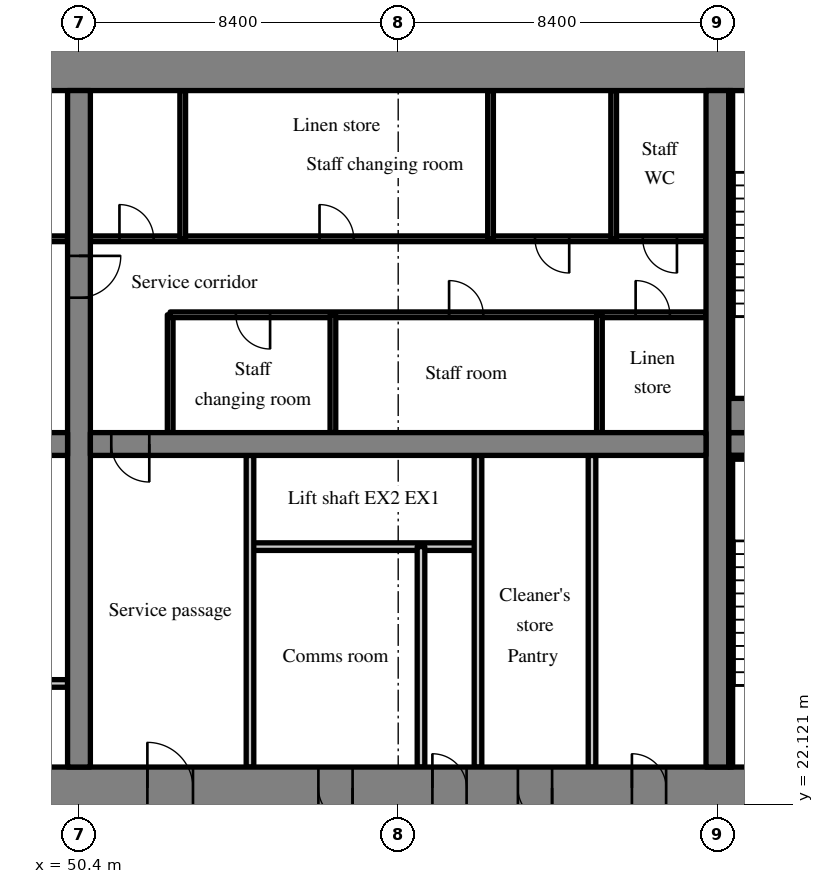
"""IFC4 building model, lengths in metres.
Left out: names, types, materials, properties, quantities, classifications, styles, units other than length and angle.
Written with IfcOpenShell. Run it as: python <this file> out.ifc"""

import sys

from ifc_helpers import new_model, si_unit, direction, frame, frame_2d, origin, place, context, subcontext, project, spatial, rectangle, extrude, source, transform, mapped, element, fill, save


model = new_model("IFC4")
c1 = context("Model", 3, precision=1e-05, world=origin(), true_north=direction((0.0, 1.0)))
c2 = subcontext(c1, "Body", "Model", "MODEL_VIEW")
j1 = project(units=[si_unit("LENGTHUNIT", "METRE"), si_unit("PLANEANGLEUNIT", "RADIAN")], contexts=[c1])
p1 = place(None, origin())
s1 = spatial("IfcSite", under=j1, at=p1, CompositionType="ELEMENT")
p2 = place(p1, origin())
s2 = spatial("IfcBuilding", under=s1, at=p2, CompositionType="ELEMENT")
p3 = place(p2, frame((0.0, 0.0, 18.0)))
s3 = spatial("IfcBuildingStorey", under=s2, at=p3, CompositionType="ELEMENT", Elevation=18.0)
m1 = source(origin(), c2, "Body", "SweptSolid", [
    extrude(rectangle(XDim=50.4, YDim=1.1, at=frame_2d((25.2, 0.0))), origin(), (0.0, 0.0, 1.0), 4.72),
])
p4 = place(p3, frame((25.2, 22.55, 0.0), z_axis=(0.0, 0.0, 1.0), x_axis=(1.0, 0.0, 0.0)))
e1 = element("IfcWall", 1, at=p4, inside=s3, PredefinedType="SHEAR", context=c2, shape_type="MappedRepresentation", body=[
    mapped(m1, transform((0.0, 0.0, 0.0), scale=1.0)),
])
m2 = source(origin(), c2, "Body", "SweptSolid", [
    extrude(rectangle(XDim=1.8, YDim=2.1, at=frame_2d((0.9, 1.05))), frame((0.0, 0.56, 0.0), z_axis=(0.0, -1.0, 0.0), x_axis=(1.0, 0.0, 0.0)), (0.0, 0.0, 1.0), 1.12),
])
p5 = place(p4, frame((15.9, 0.0, 0.0)))
e2 = element("IfcOpeningElement", 2, at=p5, cuts=e1, PredefinedType="OPENING", context=c2, shape_type="MappedRepresentation", body=[
    mapped(m2, transform((0.0, 0.0, 0.0), scale=1.0)),
])
m3 = source(origin(), c2, "Body", "SweptSolid", [
    extrude(rectangle(XDim=1.2, YDim=2.1, at=frame_2d((0.6, 1.05))), frame((0.0, 0.56, 0.0), z_axis=(0.0, -1.0, 0.0), x_axis=(1.0, 0.0, 0.0)), (0.0, 0.0, 1.0), 1.12),
])
p6 = place(p4, frame((27.0, 0.0, 0.0)))
e3 = element("IfcOpeningElement", 3, at=p6, cuts=e1, PredefinedType="OPENING", context=c2, shape_type="MappedRepresentation", body=[
    mapped(m3, transform((0.0, 0.0, 0.0), scale=1.0)),
])
m4 = source(origin(), c2, "Body", "SweptSolid", [
    extrude(rectangle(XDim=0.9, YDim=2.1, at=frame_2d((0.45, 1.05))), frame((0.0, 0.56, 0.0), z_axis=(0.0, -1.0, 0.0), x_axis=(1.0, 0.0, 0.0)), (0.0, 0.0, 1.0), 1.12),
])
p7 = place(p4, frame((34.5, 0.0, 0.0)))
e4 = element("IfcOpeningElement", 4, at=p7, cuts=e1, PredefinedType="OPENING", context=c2, shape_type="MappedRepresentation", body=[
    mapped(m4, transform((0.0, 0.0, 0.0), scale=1.0)),
])
p8 = place(p4, frame((31.5, 0.0, 0.0)))
e5 = element("IfcOpeningElement", 5, at=p8, cuts=e1, PredefinedType="OPENING", context=c2, shape_type="MappedRepresentation", body=[
    mapped(m4, transform((0.0, 0.0, 0.0), scale=1.0)),
])
p9 = place(p4, frame((39.75, 0.0, 0.0)))
e6 = element("IfcOpeningElement", 6, at=p9, cuts=e1, PredefinedType="OPENING", context=c2, shape_type="MappedRepresentation", body=[
    mapped(m4, transform((0.0, 0.0, 0.0), scale=1.0)),
])
p10 = place(p4, frame((36.75, 0.0, 0.0)))
e7 = element("IfcOpeningElement", 7, at=p10, cuts=e1, PredefinedType="OPENING", context=c2, shape_type="MappedRepresentation", body=[
    mapped(m4, transform((0.0, 0.0, 0.0), scale=1.0)),
])
p11 = place(p4, frame((6.425, 0.0, 0.0)))
e8 = element("IfcOpeningElement", 8, at=p11, cuts=e1, PredefinedType="OPENING", context=c2, shape_type="MappedRepresentation", body=[
    mapped(m3, transform((0.0, 0.0, 0.0), scale=1.0)),
])
p12 = place(p4, frame((47.675, 0.0, 0.0)))
e9 = element("IfcOpeningElement", 9, at=p12, cuts=e1, PredefinedType="OPENING", context=c2, shape_type="MappedRepresentation", body=[
    mapped(m3, transform((0.0, 0.0, 0.0), scale=1.0)),
])
p13 = place(p3, frame((25.2, 41.45, 0.0), z_axis=(0.0, 0.0, 1.0), x_axis=(1.0, 0.0, 0.0)))
e10 = element("IfcWall", 10, at=p13, inside=s3, PredefinedType="SHEAR", context=c2, shape_type="MappedRepresentation", body=[
    mapped(m1, transform((0.0, 0.0, 0.0), scale=1.0)),
])
m5 = source(origin(), c2, "Body", "SweptSolid", [
    extrude(rectangle(XDim=17.8, YDim=0.6, at=frame_2d((8.9, 0.0))), origin(), (0.0, 0.0, 1.0), 4.72),
])
p14 = place(p3, frame((50.4, 23.1, 0.0), z_axis=(0.0, 0.0, 1.0), x_axis=(0.0, 1.0, 0.0)))
e11 = element("IfcWall", 11, at=p14, inside=s3, PredefinedType="SHEAR", context=c2, shape_type="MappedRepresentation", body=[
    mapped(m5, transform((0.0, 0.0, 0.0), scale=1.0)),
])
m6 = source(origin(), c2, "Body", "SweptSolid", [
    extrude(rectangle(XDim=1.1, YDim=2.1, at=frame_2d((0.55, 1.05))), frame((0.0, 0.31, 0.0), z_axis=(0.0, -1.0, 0.0), x_axis=(1.0, 0.0, 0.0)), (0.0, 0.0, 1.0), 0.62),
])
p15 = place(p14, frame((12.35, 0.0, 0.0)))
e12 = element("IfcOpeningElement", 12, at=p15, cuts=e11, PredefinedType="OPENING", context=c2, shape_type="MappedRepresentation", body=[
    mapped(m6, transform((0.0, 0.0, 0.0), scale=1.0)),
])
p16 = place(p3, frame((67.2, 23.1, 0.0), z_axis=(0.0, 0.0, 1.0), x_axis=(0.0, 1.0, 0.0)))
e13 = element("IfcWall", 13, at=p16, inside=s3, PredefinedType="SHEAR", context=c2, shape_type="MappedRepresentation", body=[
    mapped(m5, transform((0.0, 0.0, 0.0), scale=1.0)),
])
m7 = source(origin(), c2, "Body", "SweptSolid", [
    extrude(rectangle(XDim=16.2, YDim=0.6, at=frame_2d((8.1, 0.0))), origin(), (0.0, 0.0, 1.0), 4.72),
])
p17 = place(p3, frame((33.9, 31.6, 0.0), z_axis=(0.0, 0.0, 1.0), x_axis=(1.0, 0.0, 0.0)))
e14 = element("IfcWall", 14, at=p17, inside=s3, PredefinedType="SHEAR", context=c2, shape_type="MappedRepresentation", body=[
    mapped(m7, transform((0.0, 0.0, 0.0), scale=1.0)),
])
m8 = source(origin(), c2, "Body", "SweptSolid", [
    extrude(rectangle(XDim=1.0, YDim=2.1, at=frame_2d((0.5, 1.05))), frame((0.0, 0.31, 0.0), z_axis=(0.0, -1.0, 0.0), x_axis=(1.0, 0.0, 0.0)), (0.0, 0.0, 1.0), 0.62),
])
p18 = place(p17, frame((14.65, 0.0, 0.0)))
e15 = element("IfcOpeningElement", 15, at=p18, cuts=e14, PredefinedType="OPENING", context=c2, shape_type="MappedRepresentation", body=[
    mapped(m8, transform((0.0, 0.0, 0.0), scale=1.0)),
])
m9 = source(origin(), c2, "Body", "SweptSolid", [
    extrude(rectangle(XDim=16.2, YDim=0.6, at=frame_2d((8.1, 0.0))), origin(), (0.0, 0.0, 1.0), 4.72),
])
p19 = place(p3, frame((50.7, 31.6, 0.0), z_axis=(0.0, 0.0, 1.0), x_axis=(1.0, 0.0, 0.0)))
e16 = element("IfcWall", 16, at=p19, inside=s3, PredefinedType="SHEAR", context=c2, shape_type="MappedRepresentation", body=[
    mapped(m9, transform((0.0, 0.0, 0.0), scale=1.0)),
])
p20 = place(p19, frame((0.55, 0.0, 0.0)))
e17 = element("IfcOpeningElement", 17, at=p20, cuts=e16, PredefinedType="OPENING", context=c2, shape_type="MappedRepresentation", body=[
    mapped(m8, transform((0.0, 0.0, 0.0), scale=1.0)),
])
m10 = source(origin(), c2, "Body", "SweptSolid", [
    extrude(rectangle(XDim=7.0, YDim=0.6, at=frame_2d((3.5, 0.0))), origin(), (0.0, 0.0, 1.0), 4.72),
])
p21 = place(p3, frame((67.5, 31.6, 0.0), z_axis=(0.0, 0.0, 1.0), x_axis=(1.0, 0.0, 0.0)))
e18 = element("IfcWall", 18, at=p21, inside=s3, PredefinedType="SHEAR", context=c2, shape_type="MappedRepresentation", body=[
    mapped(m10, transform((0.0, 0.0, 0.0), scale=1.0)),
])
p22 = place(p21, frame((5.425, 0.0, 0.0)))
e19 = element("IfcOpeningElement", 19, at=p22, cuts=e18, PredefinedType="OPENING", context=c2, shape_type="MappedRepresentation", body=[
    mapped(m6, transform((0.0, 0.0, 0.0), scale=1.0)),
])
m11 = source(origin(), c2, "Body", "SweptSolid", [
    extrude(rectangle(XDim=6.0, YDim=0.2, at=frame_2d((3.0, 0.0))), origin(), (0.0, 0.0, 1.0), 4.72),
])
p23 = place(p3, frame((44.1, 25.3, 0.0), z_axis=(0.0, 0.0, 1.0), x_axis=(1.0, 0.0, 0.0)))
e20 = element("IfcWall", 20, at=p23, inside=s3, PredefinedType="SOLIDWALL", context=c2, shape_type="MappedRepresentation", body=[
    mapped(m11, transform((0.0, 0.0, 0.0), scale=1.0)),
])
m12 = source(origin(), c2, "Body", "SweptSolid", [
    extrude(rectangle(XDim=1.1, YDim=2.1, at=frame_2d((0.55, 1.05))), frame((0.0, 0.11, 0.0), z_axis=(0.0, -1.0, 0.0), x_axis=(1.0, 0.0, 0.0)), (0.0, 0.0, 1.0), 0.22),
])
p24 = place(p23, frame((0.95, 0.0, 0.0)))
e21 = element("IfcOpeningElement", 21, at=p24, cuts=e20, PredefinedType="OPENING", context=c2, shape_type="MappedRepresentation", body=[
    mapped(m12, transform((0.0, 0.0, 0.0), scale=1.0)),
])
p25 = place(p23, frame((3.95, 0.0, 0.0)))
e22 = element("IfcOpeningElement", 22, at=p25, cuts=e20, PredefinedType="OPENING", context=c2, shape_type="MappedRepresentation", body=[
    mapped(m12, transform((0.0, 0.0, 0.0), scale=1.0)),
])
m13 = source(origin(), c2, "Body", "SweptSolid", [
    extrude(rectangle(XDim=16.2, YDim=0.15, at=frame_2d((8.1, 0.0))), origin(), (0.0, 0.0, 1.0), 4.72),
])
p26 = place(p3, frame((33.9, 37.0, 0.0), z_axis=(0.0, 0.0, 1.0), x_axis=(1.0, 0.0, 0.0)))
e23 = element("IfcWall", 23, at=p26, inside=s3, PredefinedType="PARTITIONING", context=c2, shape_type="MappedRepresentation", body=[
    mapped(m13, transform((0.0, 0.0, 0.0), scale=1.0)),
])
m14 = source(origin(), c2, "Body", "SweptSolid", [
    extrude(rectangle(XDim=0.9, YDim=2.1, at=frame_2d((0.45, 1.05))), frame((0.0, 0.085, 0.0), z_axis=(0.0, -1.0, 0.0), x_axis=(1.0, 0.0, 0.0)), (0.0, 0.0, 1.0), 0.17),
])
p27 = place(p26, frame((3.195, 0.0, 0.0)))
e24 = element("IfcOpeningElement", 24, at=p27, cuts=e23, PredefinedType="OPENING", context=c2, shape_type="MappedRepresentation", body=[
    mapped(m14, transform((0.0, 0.0, 0.0), scale=1.0)),
])
p28 = place(p26, frame((8.055, 0.0, 0.0)))
e25 = element("IfcOpeningElement", 25, at=p28, cuts=e23, PredefinedType="OPENING", context=c2, shape_type="MappedRepresentation", body=[
    mapped(m14, transform((0.0, 0.0, 0.0), scale=1.0)),
])
p29 = place(p26, frame((11.295, 0.0, 0.0)))
e26 = element("IfcOpeningElement", 26, at=p29, cuts=e23, PredefinedType="OPENING", context=c2, shape_type="MappedRepresentation", body=[
    mapped(m14, transform((0.0, 0.0, 0.0), scale=1.0)),
])
p30 = place(p26, frame((14.535, 0.0, 0.0)))
e27 = element("IfcOpeningElement", 27, at=p30, cuts=e23, PredefinedType="OPENING", context=c2, shape_type="MappedRepresentation", body=[
    mapped(m14, transform((0.0, 0.0, 0.0), scale=1.0)),
])
p31 = place(p3, frame((60.9, 28.9, 0.0), z_axis=(0.0, 0.0, 1.0), x_axis=(-1.0, 0.0, 0.0)))
e28 = element("IfcWall", 28, at=p31, inside=s3, PredefinedType="SOLIDWALL", context=c2, shape_type="MappedRepresentation", body=[
    mapped(m11, transform((0.0, 0.0, 0.0), scale=1.0)),
])
m15 = source(origin(), c2, "Body", "SweptSolid", [
    extrude(rectangle(XDim=8.2, YDim=0.2, at=frame_2d((4.1, 0.0))), origin(), (0.0, 0.0, 1.0), 4.72),
])
for number, where, z_axis, x_axis in (
    (29, (54.9, 23.1, 0.0), (0.0, 0.0, 1.0), (0.0, 1.0, 0.0)),
    (30, (60.9, 23.1, 0.0), (0.0, 0.0, 1.0), (0.0, 1.0, 0.0)),
):
    element("IfcWall", number, at=place(p3, frame(where, z_axis=z_axis, x_axis=x_axis)), inside=s3, PredefinedType="PARTITIONING", context=c2, shape_type="MappedRepresentation", body=[
        mapped(m15, transform((0.0, 0.0, 0.0), scale=1.0)),
    ])
m16 = source(origin(), c2, "Body", "SweptSolid", [
    extrude(rectangle(XDim=5.8, YDim=0.2, at=frame_2d((2.9, 0.0))), origin(), (0.0, 0.0, 1.0), 4.72),
])
p32 = place(p3, frame((59.4, 23.1, 0.0), z_axis=(0.0, 0.0, 1.0), x_axis=(0.0, 1.0, 0.0)))
e31 = element("IfcWall", 31, at=p32, inside=s3, PredefinedType="PARTITIONING", context=c2, shape_type="MappedRepresentation", body=[
    mapped(m16, transform((0.0, 0.0, 0.0), scale=1.0)),
])
p33 = place(p3, frame((63.9, 23.1, 0.0), z_axis=(0.0, 0.0, 1.0), x_axis=(0.0, 1.0, 0.0)))
e32 = element("IfcWall", 32, at=p33, inside=s3, PredefinedType="PARTITIONING", context=c2, shape_type="MappedRepresentation", body=[
    mapped(m15, transform((0.0, 0.0, 0.0), scale=1.0)),
])
m17 = source(origin(), c2, "Body", "SweptSolid", [
    extrude(rectangle(XDim=3.1, YDim=0.15, at=frame_2d((1.55, 0.0))), origin(), (0.0, 0.0, 1.0), 4.72),
])
p34 = place(p3, frame((52.8, 31.9, 0.0), z_axis=(0.0, 0.0, 1.0), x_axis=(0.0, 1.0, 0.0)))
e33 = element("IfcWall", 33, at=p34, inside=s3, PredefinedType="PARTITIONING", context=c2, shape_type="MappedRepresentation", body=[
    mapped(m17, transform((0.0, 0.0, 0.0), scale=1.0)),
])
m18 = source(origin(), c2, "Body", "SweptSolid", [
    extrude(rectangle(XDim=14.1, YDim=0.15, at=frame_2d((7.05, 0.0))), origin(), (0.0, 0.0, 1.0), 4.72),
])
p35 = place(p3, frame((66.9, 35.0, 0.0), z_axis=(0.0, 0.0, 1.0), x_axis=(-1.0, 0.0, 0.0)))
e34 = element("IfcWall", 34, at=p35, inside=s3, PredefinedType="PARTITIONING", context=c2, shape_type="MappedRepresentation", body=[
    mapped(m18, transform((0.0, 0.0, 0.0), scale=1.0)),
])
p36 = place(p35, frame((0.952, 0.0, 0.0)))
e35 = element("IfcOpeningElement", 35, at=p36, cuts=e34, PredefinedType="OPENING", context=c2, shape_type="MappedRepresentation", body=[
    mapped(m14, transform((0.0, 0.0, 0.0), scale=1.0)),
])
p37 = place(p35, frame((5.861, 0.0, 0.0)))
e36 = element("IfcOpeningElement", 36, at=p37, cuts=e34, PredefinedType="OPENING", context=c2, shape_type="MappedRepresentation", body=[
    mapped(m14, transform((0.0, 0.0, 0.0), scale=1.0)),
])
p38 = place(p35, frame((11.471, 0.0, 0.0)))
e37 = element("IfcOpeningElement", 37, at=p38, cuts=e34, PredefinedType="OPENING", context=c2, shape_type="MappedRepresentation", body=[
    mapped(m14, transform((0.0, 0.0, 0.0), scale=1.0)),
])
m19 = source(origin(), c2, "Body", "SweptSolid", [
    extrude(rectangle(XDim=16.2, YDim=0.15, at=frame_2d((8.1, 0.0))), origin(), (0.0, 0.0, 1.0), 4.72),
])
p39 = place(p3, frame((66.9, 37.0, 0.0), z_axis=(0.0, 0.0, 1.0), x_axis=(-1.0, 0.0, 0.0)))
e38 = element("IfcWall", 38, at=p39, inside=s3, PredefinedType="PARTITIONING", context=c2, shape_type="MappedRepresentation", body=[
    mapped(m19, transform((0.0, 0.0, 0.0), scale=1.0)),
])
p40 = place(p39, frame((0.765, 0.0, 0.0)))
e39 = element("IfcOpeningElement", 39, at=p40, cuts=e38, PredefinedType="OPENING", context=c2, shape_type="MappedRepresentation", body=[
    mapped(m14, transform((0.0, 0.0, 0.0), scale=1.0)),
])
p41 = place(p39, frame((3.6, 0.0, 0.0)))
e40 = element("IfcOpeningElement", 40, at=p41, cuts=e38, PredefinedType="OPENING", context=c2, shape_type="MappedRepresentation", body=[
    mapped(m14, transform((0.0, 0.0, 0.0), scale=1.0)),
])
p42 = place(p39, frame((9.27, 0.0, 0.0)))
e41 = element("IfcOpeningElement", 41, at=p42, cuts=e38, PredefinedType="OPENING", context=c2, shape_type="MappedRepresentation", body=[
    mapped(m14, transform((0.0, 0.0, 0.0), scale=1.0)),
])
p43 = place(p39, frame((14.535, 0.0, 0.0)))
e42 = element("IfcOpeningElement", 42, at=p43, cuts=e38, PredefinedType="OPENING", context=c2, shape_type="MappedRepresentation", body=[
    mapped(m14, transform((0.0, 0.0, 0.0), scale=1.0)),
])
for number, where, z_axis, x_axis in (
    (43, (64.095, 31.9, 0.0), (0.0, 0.0, 1.0), (0.0, 1.0, 0.0)),
    (44, (57.082, 31.9, 0.0), (0.0, 0.0, 1.0), (0.0, 1.0, 0.0)),
):
    element("IfcWall", number, at=place(p3, frame(where, z_axis=z_axis, x_axis=x_axis)), inside=s3, PredefinedType="PARTITIONING", context=c2, shape_type="MappedRepresentation", body=[
        mapped(m17, transform((0.0, 0.0, 0.0), scale=1.0)),
    ])
m20 = source(origin(), c2, "Body", "SweptSolid", [
    extrude(rectangle(XDim=3.9, YDim=0.15, at=frame_2d((1.95, 0.0))), origin(), (0.0, 0.0, 1.0), 4.72),
])
for number, where, z_axis, x_axis in (
    (45, (64.47, 37.0, 0.0), (0.0, 0.0, 1.0), (0.0, 1.0, 0.0)),
    (46, (61.23, 37.0, 0.0), (0.0, 0.0, 1.0), (0.0, 1.0, 0.0)),
    (47, (53.13, 37.0, 0.0), (0.0, 0.0, 1.0), (0.0, 1.0, 0.0)),
):
    element("IfcWall", number, at=place(p3, frame(where, z_axis=z_axis, x_axis=x_axis)), inside=s3, PredefinedType="PARTITIONING", context=c2, shape_type="MappedRepresentation", body=[
        mapped(m20, transform((0.0, 0.0, 0.0), scale=1.0)),
    ])
m21 = source(origin(), c2, "Body", "SweptSolid", [
    extrude(rectangle(XDim=4.75, YDim=0.1, at=frame_2d((2.375, 0.0))), origin(), (0.0, 0.0, 1.0), 4.72),
])
p44 = place(p3, frame((67.5, 31.25, 0.0), z_axis=(0.0, 0.0, 1.0), x_axis=(1.0, 0.0, 0.0)))
e48 = element("IfcWall", 48, at=p44, inside=s3, PredefinedType="SOLIDWALL", context=c2, shape_type="MappedRepresentation", body=[
    mapped(m21, transform((0.0, 0.0, 0.0), scale=1.0)),
])
m22 = source(origin(), c2, "Body", "SweptSolid", [
    extrude(rectangle(XDim=8.1, YDim=0.1, at=frame_2d((4.05, 0.0))), origin(), (0.0, 0.0, 1.0), 4.72),
])
p45 = place(p3, frame((67.55, 23.1, 0.0), z_axis=(0.0, 0.0, 1.0), x_axis=(0.0, 1.0, 0.0)))
e49 = element("IfcWall", 49, at=p45, inside=s3, PredefinedType="SOLIDWALL", context=c2, shape_type="MappedRepresentation", body=[
    mapped(m22, transform((0.0, 0.0, 0.0), scale=1.0)),
])
m23 = source(origin(), c2, "Body", "SweptSolid", [
    extrude(rectangle(XDim=4.75, YDim=0.9, at=frame_2d((2.375, 0.0))), origin(), (0.0, 0.0, 1.0), 4.72),
])
p46 = place(p3, frame((67.5, 32.35, 0.0), z_axis=(0.0, 0.0, 1.0), x_axis=(1.0, 0.0, 0.0)))
e50 = element("IfcWall", 50, at=p46, inside=s3, PredefinedType="SOLIDWALL", context=c2, shape_type="MappedRepresentation", body=[
    mapped(m23, transform((0.0, 0.0, 0.0), scale=1.0)),
])
p47 = place(p3, frame((67.55, 32.8, 0.0), z_axis=(0.0, 0.0, 1.0), x_axis=(0.0, 1.0, 0.0)))
e51 = element("IfcWall", 51, at=p47, inside=s3, PredefinedType="SOLIDWALL", context=c2, shape_type="MappedRepresentation", body=[
    mapped(m22, transform((0.0, 0.0, 0.0), scale=1.0)),
])
m24 = source(origin(), c2, "Body", "SweptSolid", [
    extrude(rectangle(XDim=1.2, YDim=2.1, at=frame_2d((0.6, 1.05))), frame((0.0, 0.325, 0.0), z_axis=(0.0, -1.0, 0.0), x_axis=(1.0, 0.0, 0.0)), (0.0, 0.0, 1.0), 0.05),
])
p48 = place(p6, origin())
e52 = element("IfcDoor", 52, at=p48, inside=s3, OperationType="SINGLE_SWING_LEFT", PredefinedType="DOOR", context=c2, shape_type="MappedRepresentation", body=[
    mapped(m24, transform((0.0, 0.0, 0.0), scale=1.0)),
])
fill(e3, e52)
m25 = source(origin(), c2, "Body", "SweptSolid", [
    extrude(rectangle(XDim=1.0, YDim=2.1, at=frame_2d((0.5, 1.05))), frame((0.0, 0.025, 0.0), z_axis=(0.0, -1.0, 0.0), x_axis=(1.0, 0.0, 0.0)), (0.0, 0.0, 1.0), 0.05),
])
p49 = place(p20, origin())
e53 = element("IfcDoor", 53, at=p49, inside=s3, OperationType="SINGLE_SWING_RIGHT", PredefinedType="DOOR", context=c2, shape_type="MappedRepresentation", body=[
    mapped(m25, transform((0.0, 0.0, 0.0), scale=1.0)),
])
fill(e17, e53)
m26 = source(origin(), c2, "Body", "SweptSolid", [
    extrude(rectangle(XDim=0.9, YDim=2.1, at=frame_2d((0.45, 1.05))), frame((0.0, 0.325, 0.0), z_axis=(0.0, -1.0, 0.0), x_axis=(1.0, 0.0, 0.0)), (0.0, 0.0, 1.0), 0.05),
])
p50 = place(p7, origin())
e54 = element("IfcDoor", 54, at=p50, inside=s3, OperationType="SINGLE_SWING_LEFT", PredefinedType="DOOR", context=c2, shape_type="MappedRepresentation", body=[
    mapped(m26, transform((0.0, 0.0, 0.0), scale=1.0)),
])
fill(e4, e54)
p51 = place(p8, origin())
e55 = element("IfcDoor", 55, at=p51, inside=s3, OperationType="SINGLE_SWING_RIGHT", PredefinedType="DOOR", context=c2, shape_type="MappedRepresentation", body=[
    mapped(m26, transform((0.0, 0.0, 0.0), scale=1.0)),
])
fill(e5, e55)
p52 = place(p9, origin())
e56 = element("IfcDoor", 56, at=p52, inside=s3, OperationType="SINGLE_SWING_LEFT", PredefinedType="DOOR", context=c2, shape_type="MappedRepresentation", body=[
    mapped(m26, transform((0.0, 0.0, 0.0), scale=1.0)),
])
fill(e6, e56)
p53 = place(p10, origin())
e57 = element("IfcDoor", 57, at=p53, inside=s3, OperationType="SINGLE_SWING_RIGHT", PredefinedType="DOOR", context=c2, shape_type="MappedRepresentation", body=[
    mapped(m26, transform((0.0, 0.0, 0.0), scale=1.0)),
])
fill(e7, e57)
m27 = source(origin(), c2, "Body", "SweptSolid", [
    extrude(rectangle(XDim=0.9, YDim=2.1, at=frame_2d((0.45, 1.05))), frame((0.0, 0.025, 0.0), z_axis=(0.0, -1.0, 0.0), x_axis=(1.0, 0.0, 0.0)), (0.0, 0.0, 1.0), 0.05),
])
p54 = place(p36, origin())
e58 = element("IfcDoor", 58, at=p54, inside=s3, OperationType="SINGLE_SWING_RIGHT", PredefinedType="DOOR", context=c2, shape_type="MappedRepresentation", body=[
    mapped(m27, transform((0.0, 0.0, 0.0), scale=1.0)),
])
fill(e35, e58)
p55 = place(p37, origin())
e59 = element("IfcDoor", 59, at=p55, inside=s3, OperationType="SINGLE_SWING_RIGHT", PredefinedType="DOOR", context=c2, shape_type="MappedRepresentation", body=[
    mapped(m27, transform((0.0, 0.0, 0.0), scale=1.0)),
])
fill(e36, e59)
p56 = place(p38, origin())
e60 = element("IfcDoor", 60, at=p56, inside=s3, OperationType="SINGLE_SWING_LEFT", PredefinedType="DOOR", context=c2, shape_type="MappedRepresentation", body=[
    mapped(m27, transform((0.0, 0.0, 0.0), scale=1.0)),
])
fill(e37, e60)
p57 = place(p40, origin())
e61 = element("IfcDoor", 61, at=p57, inside=s3, OperationType="SINGLE_SWING_LEFT", PredefinedType="DOOR", context=c2, shape_type="MappedRepresentation", body=[
    mapped(m27, transform((0.0, 0.0, 0.0), scale=1.0)),
])
fill(e39, e61)
p58 = place(p41, origin())
e62 = element("IfcDoor", 62, at=p58, inside=s3, OperationType="SINGLE_SWING_LEFT", PredefinedType="DOOR", context=c2, shape_type="MappedRepresentation", body=[
    mapped(m27, transform((0.0, 0.0, 0.0), scale=1.0)),
])
fill(e40, e62)
p59 = place(p42, origin())
e63 = element("IfcDoor", 63, at=p59, inside=s3, OperationType="SINGLE_SWING_RIGHT", PredefinedType="DOOR", context=c2, shape_type="MappedRepresentation", body=[
    mapped(m27, transform((0.0, 0.0, 0.0), scale=1.0)),
])
fill(e41, e63)
p60 = place(p43, origin())
e64 = element("IfcDoor", 64, at=p60, inside=s3, OperationType="SINGLE_SWING_RIGHT", PredefinedType="DOOR", context=c2, shape_type="MappedRepresentation", body=[
    mapped(m27, transform((0.0, 0.0, 0.0), scale=1.0)),
])
fill(e42, e64)
m28 = source(origin(), c2, "Body", "SweptSolid", [
    extrude(rectangle(XDim=1.1, YDim=2.1, at=frame_2d((0.55, 1.05))), frame((0.0, 0.025, 0.0), z_axis=(0.0, -1.0, 0.0), x_axis=(1.0, 0.0, 0.0)), (0.0, 0.0, 1.0), 0.05),
])
p61 = place(p15, origin())
e65 = element("IfcDoor", 65, at=p61, inside=s3, OperationType="SINGLE_SWING_RIGHT", PredefinedType="DOOR", context=c2, shape_type="MappedRepresentation", body=[
    mapped(m28, transform((0.0, 0.0, 0.0), scale=1.0)),
])
fill(e12, e65)
save(model, sys.argv[1])
